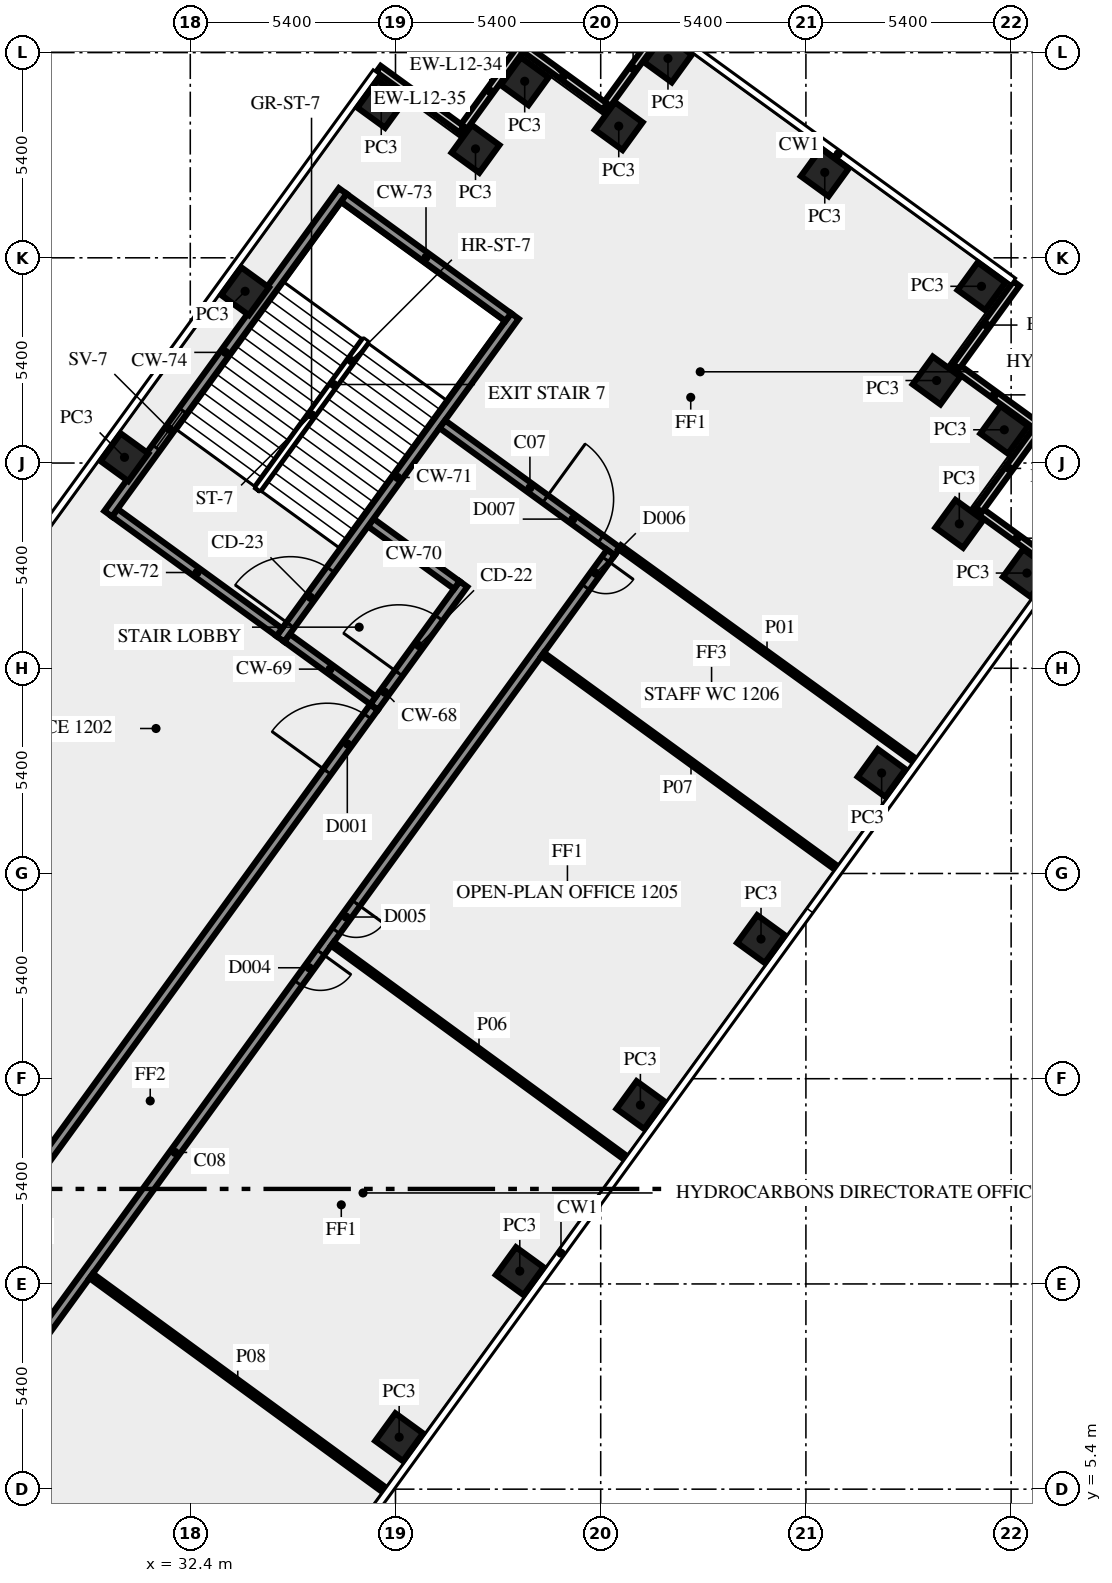
"""IFC4 building model, lengths in metres.
Left out: names, types, materials, properties, quantities, classifications, styles, units other than length and angle.
Written with IfcOpenShell. Run it as: python <this file> out.ifc"""

import sys

from ifc_helpers import new_model, si_unit, direction, frame, frame_2d, origin, origin_2d, place, context, subcontext, project, spatial, rectangle, extrude, element, fill, save


model = new_model("IFC4")
c1 = context("Model", 3, precision=1e-05, world=origin(), true_north=direction((0.0, 1.0)))
c2 = subcontext(c1, "Body", "Model", "MODEL_VIEW")
j1 = project(units=[si_unit("LENGTHUNIT", "METRE"), si_unit("PLANEANGLEUNIT", "RADIAN")], contexts=[c1])
p1 = place(None, origin())
s1 = spatial("IfcSite", under=j1, at=p1, CompositionType="ELEMENT")
p2 = place(p1, origin())
s2 = spatial("IfcBuilding", under=s1, at=p2, CompositionType="ELEMENT")
p3 = place(p2, frame((0.0, 0.0, 55.0)))
s3 = spatial("IfcBuildingStorey", under=s2, at=p3, CompositionType="ELEMENT", Elevation=55.0)
for number, where, z_axis, x_axis in (
    (1, (37.896, 6.769, 0.0), (0.0, 0.0, 1.0), (0.588, 0.809, 0.0)),
    (2, (41.07, 11.137, 0.0), (0.0, 0.0, 1.0), (0.588, 0.809, 0.0)),
    (3, (44.244, 15.506, 0.0), (0.0, 0.0, 1.0), (0.588, 0.809, 0.0)),
    (4, (47.418, 19.875, 0.0), (0.0, 0.0, 1.0), (0.588, 0.809, 0.0)),
    (5, (50.592, 24.243, 0.0), (0.0, 0.0, 1.0), (0.588, 0.809, 0.0)),
    (6, (54.415, 29.505, 0.0), (0.0, 0.0, 1.0), (0.588, 0.809, 0.0)),
    (7, (52.636, 30.8, 0.0), (0.0, 0.0, 1.0), (-0.809, 0.588, 0.0)),
    (8, (53.82, 33.275, 0.0), (0.0, 0.0, 1.0), (-0.809, 0.588, 0.0)),
    (9, (52.039, 34.571, 0.0), (0.0, 0.0, 1.0), (0.588, 0.809, 0.0)),
    (10, (53.22, 37.05, 0.0), (0.0, 0.0, 1.0), (-0.809, 0.588, 0.0)),
    (11, (49.096, 40.047, 0.0), (0.0, 0.0, 1.0), (-0.809, 0.588, 0.0)),
    (12, (44.97, 43.045, 0.0), (0.0, 0.0, 1.0), (-0.809, 0.588, 0.0)),
    (13, (43.675, 41.265, 0.0), (0.0, 0.0, 1.0), (-0.809, 0.588, 0.0)),
    (14, (41.2, 42.445, 0.0), (0.0, 0.0, 1.0), (-0.588, -0.809, 0.0)),
    (15, (39.906, 40.666, 0.0), (0.0, 0.0, 1.0), (-0.588, -0.809, 0.0)),
    (16, (37.425, 41.85, 0.0), (0.0, 0.0, 1.0), (-0.588, -0.809, 0.0)),
    (17, (33.843, 36.919, 0.0), (0.0, 0.0, 1.0), (-0.588, -0.809, 0.0)),
    (18, (30.669, 32.55, 0.0), (0.0, 0.0, 1.0), (-0.588, -0.809, 0.0)),
):
    element("IfcColumn", number, at=place(p3, frame(where, z_axis=z_axis, x_axis=x_axis)), inside=s3, PredefinedType="COLUMN", context=c2, shape_type="SweptSolid", body=[
        extrude(rectangle(XDim=0.9, YDim=0.9, at=origin_2d()), origin(), (0.0, 0.0, 1.0), 3.65),
    ])
p4 = place(p3, frame((55.247, 29.629, 0.0), z_axis=(0.0, 0.0, 1.0), x_axis=(-0.809033161865, 0.587762999008, 0.0)))
e19 = element("IfcWall", 19, at=p4, inside=s3, PredefinedType="SOLIDWALL", context=c2, shape_type="SweptSolid", body=[
    extrude(rectangle(XDim=2.7, YDim=0.2, at=frame_2d((1.35, 0.0))), origin(), (0.0, 0.0, 1.0), 3.65),
])
p5 = place(p3, frame((53.151, 31.167, 0.0), z_axis=(0.0, 0.0, 1.0), x_axis=(0.587779184282, 0.809021403008, 0.0)))
e20 = element("IfcWall", 20, at=p5, inside=s3, PredefinedType="SOLIDWALL", context=c2, shape_type="SweptSolid", body=[
    extrude(rectangle(XDim=2.7, YDim=0.2, at=frame_2d((1.35, 0.0))), origin(), (0.0, 0.0, 1.0), 3.65),
])
for number, where, z_axis, x_axis in (
    (21, (54.65, 33.4, 0.0), (0.0, 0.0, 1.0), (-0.809, 0.588, 0.0)),
    (22, (52.553, 34.938, 0.0), (0.0, 0.0, 1.0), (0.588, 0.809, 0.0)),
    (23, (44.846, 43.875, 0.0), (0.0, 0.0, 1.0), (-0.588, -0.809, 0.0)),
    (24, (43.308, 41.779, 0.0), (0.0, 0.0, 1.0), (-0.809, 0.588, 0.0)),
):
    element("IfcWall", number, at=place(p3, frame(where, z_axis=z_axis, x_axis=x_axis)), inside=s3, PredefinedType="SOLIDWALL", context=c2, shape_type="SweptSolid", body=[
        extrude(rectangle(XDim=2.7, YDim=0.2, at=frame_2d((1.35, 0.0))), origin(), (0.0, 0.0, 1.0), 3.65),
    ])
p6 = place(p3, frame((41.075, 43.278, 0.0), z_axis=(0.0, 0.0, 1.0), x_axis=(-0.587806000234, -0.809001919707, 0.0)))
e25 = element("IfcWall", 25, at=p6, inside=s3, PredefinedType="SOLIDWALL", context=c2, shape_type="SweptSolid", body=[
    extrude(rectangle(XDim=2.7, YDim=0.2, at=frame_2d((1.35, 0.0))), origin(), (0.0, 0.0, 1.0), 3.65),
])
p7 = place(p3, frame((39.537, 41.181, 0.0), z_axis=(0.0, 0.0, 1.0), x_axis=(-0.809033161865, 0.587762999008, 0.0)))
e26 = element("IfcWall", 26, at=p7, inside=s3, PredefinedType="SOLIDWALL", context=c2, shape_type="SweptSolid", body=[
    extrude(rectangle(XDim=2.7, YDim=0.2, at=frame_2d((1.35, 0.0))), origin(), (0.0, 0.0, 1.0), 3.65),
])
p8 = place(p3, frame((37.238, 25.98, 0.0), z_axis=(0.0, 0.0, 1.0), x_axis=(0.587772420479, 0.809026317077, 0.0)))
e27 = element("IfcWall", 27, at=p8, inside=s3, PredefinedType="SHEAR", context=c2, shape_type="SweptSolid", body=[
    extrude(rectangle(XDim=4.0, YDim=0.25, at=frame_2d((2.0, 0.0))), origin(), (0.0, 0.0, 1.0), 3.65),
])
p9 = place(p8, frame((1.1, 0.0, 0.0)))
e28 = element("IfcOpeningElement", 28, at=p9, cuts=e27, PredefinedType="OPENING", context=c2, shape_type="SweptSolid", body=[
    extrude(rectangle(XDim=1.8, YDim=2.1, at=frame_2d((0.9, 1.05))), frame((0.0, 0.135, 0.0), z_axis=(0.0, -1.0, 0.0), x_axis=(1.0, 0.0, 0.0)), (0.0, 0.0, 1.0), 0.27),
])
for number, where, z_axis, x_axis in (
    (29, (37.21, 26.154, 0.0), (0.0, 0.0, 1.0), (-0.809, 0.588, 0.0)),
    (30, (39.414, 29.188, 0.0), (0.0, 0.0, 1.0), (-0.809, 0.588, 0.0)),
):
    element("IfcWall", number, at=place(p3, frame(where, z_axis=z_axis, x_axis=x_axis)), inside=s3, PredefinedType="SHEAR", context=c2, shape_type="SweptSolid", body=[
        extrude(rectangle(XDim=2.8, YDim=0.25, at=frame_2d((1.4, 0.0))), origin(), (0.0, 0.0, 1.0), 3.65),
    ])
p10 = place(p3, frame((34.77, 27.772, 0.0), z_axis=(0.0, 0.0, 1.0), x_axis=(0.587795589702, 0.809009483706, 0.0)))
e31 = element("IfcWall", 31, at=p10, inside=s3, PredefinedType="SHEAR", context=c2, shape_type="SweptSolid", body=[
    extrude(rectangle(XDim=10.5, YDim=0.25, at=frame_2d((5.25, 0.0))), origin(), (0.0, 0.0, 1.0), 3.65),
])
p11 = place(p10, frame((0.45, 0.0, 0.0)))
e32 = element("IfcOpeningElement", 32, at=p11, cuts=e31, PredefinedType="OPENING", context=c2, shape_type="SweptSolid", body=[
    extrude(rectangle(XDim=1.8, YDim=2.1, at=frame_2d((0.9, 1.05))), frame((0.0, 0.135, 0.0), z_axis=(0.0, -1.0, 0.0), x_axis=(1.0, 0.0, 0.0)), (0.0, 0.0, 1.0), 0.27),
])
p12 = place(p3, frame((34.742, 27.947, 0.0), z_axis=(0.0, 0.0, 1.0), x_axis=(-0.8089984606, 0.587810760999, 0.0)))
e33 = element("IfcWall", 33, at=p12, inside=s3, PredefinedType="SHEAR", context=c2, shape_type="SweptSolid", body=[
    extrude(rectangle(XDim=5.35, YDim=0.25, at=frame_2d((2.675, 0.0))), origin(), (0.0, 0.0, 1.0), 3.65),
])
p13 = place(p3, frame((40.767, 36.24, 0.0), z_axis=(0.0, 0.0, 1.0), x_axis=(-0.809020161303, 0.587780893365, 0.0)))
e34 = element("IfcWall", 34, at=p13, inside=s3, PredefinedType="SHEAR", context=c2, shape_type="SweptSolid", body=[
    extrude(rectangle(XDim=5.35, YDim=0.25, at=frame_2d((2.675, 0.0))), origin(), (0.0, 0.0, 1.0), 3.65),
])
p14 = place(p3, frame((30.24, 31.064, 0.0), z_axis=(0.0, 0.0, 1.0), x_axis=(0.587795589702, 0.809009483706, 0.0)))
e35 = element("IfcWall", 35, at=p14, inside=s3, PredefinedType="SHEAR", context=c2, shape_type="SweptSolid", body=[
    extrude(rectangle(XDim=10.5, YDim=0.25, at=frame_2d((5.25, 0.0))), origin(), (0.0, 0.0, 1.0), 3.65),
])
p15 = place(p14, frame((2.15, 0.0, 1.0)))
e36 = element("IfcOpeningElement", 36, at=p15, cuts=e35, PredefinedType="OPENING", context=c2, shape_type="SweptSolid", body=[
    extrude(rectangle(XDim=1.2, YDim=1.2, at=frame_2d((0.6, 0.6))), frame((0.0, 0.135, 0.0), z_axis=(0.0, -1.0, 0.0), x_axis=(1.0, 0.0, 0.0)), (0.0, 0.0, 1.0), 0.27),
])
p16 = place(p3, frame((17.545, -1.125, 0.0), z_axis=(0.0, 0.0, 1.0), x_axis=(0.587786323093, 0.809016216391, 0.0)))
e37 = element("IfcWall", 37, at=p16, inside=s3, PredefinedType="SOLIDWALL", context=c2, shape_type="SweptSolid", body=[
    extrude(rectangle(XDim=33.493, YDim=0.25, at=frame_2d((16.747, 0.0))), origin(), (0.0, 0.0, 1.0), 3.65),
])
p17 = place(p16, frame((31.403, 0.0, 0.0)))
e38 = element("IfcOpeningElement", 38, at=p17, cuts=e37, PredefinedType="OPENING", context=c2, shape_type="SweptSolid", body=[
    extrude(rectangle(XDim=1.8, YDim=2.1, at=frame_2d((0.9, 1.05))), frame((0.0, 0.135, 0.0), z_axis=(0.0, -1.0, 0.0), x_axis=(1.0, 0.0, 0.0)), (0.0, 0.0, 1.0), 0.27),
])
p18 = place(p16, frame((3.392, 0.0, 0.0)))
e39 = element("IfcOpeningElement", 39, at=p18, cuts=e37, PredefinedType="OPENING", context=c2, shape_type="SweptSolid", body=[
    extrude(rectangle(XDim=1.8, YDim=2.1, at=frame_2d((0.9, 1.05))), frame((0.0, 0.135, 0.0), z_axis=(0.0, -1.0, 0.0), x_axis=(1.0, 0.0, 0.0)), (0.0, 0.0, 1.0), 0.27),
])
p19 = place(p3, frame((39.034, 33.42, 0.0), z_axis=(0.0, 0.0, 1.0), x_axis=(0.809023325802, -0.587776537732, 0.0)))
e40 = element("IfcWall", 40, at=p19, inside=s3, PredefinedType="SOLIDWALL", context=c2, shape_type="SweptSolid", body=[
    extrude(rectangle(XDim=5.695, YDim=0.25, at=frame_2d((2.848, 0.0))), origin(), (0.0, 0.0, 1.0), 3.65),
])
p20 = place(p19, frame((3.345, 0.0, 0.0)))
e41 = element("IfcOpeningElement", 41, at=p20, cuts=e40, PredefinedType="OPENING", context=c2, shape_type="SweptSolid", body=[
    extrude(rectangle(XDim=1.8, YDim=2.1, at=frame_2d((0.9, 1.05))), frame((0.0, 0.135, 0.0), z_axis=(0.0, -1.0, 0.0), x_axis=(1.0, 0.0, 0.0)), (0.0, 0.0, 1.0), 0.27),
])
p21 = place(p3, frame((43.467, 30.045, 0.0), z_axis=(0.0, 0.0, 1.0), x_axis=(-0.587784726077, -0.809017376692, 0.0)))
e42 = element("IfcWall", 42, at=p21, inside=s3, PredefinedType="SOLIDWALL", context=c2, shape_type="SweptSolid", body=[
    extrude(rectangle(XDim=39.02, YDim=0.25, at=frame_2d((19.51, 0.0))), origin(), (0.0, 0.0, 1.0), 3.65),
])
p22 = place(p21, frame((11.404, 0.0, 0.0)))
e43 = element("IfcOpeningElement", 43, at=p22, cuts=e42, PredefinedType="OPENING", context=c2, shape_type="SweptSolid", body=[
    extrude(rectangle(XDim=0.9, YDim=2.1, at=frame_2d((0.45, 1.05))), frame((0.0, 0.135, 0.0), z_axis=(0.0, -1.0, 0.0), x_axis=(1.0, 0.0, 0.0)), (0.0, 0.0, 1.0), 0.27),
])
p23 = place(p21, frame((13.004, 0.0, 0.0)))
e44 = element("IfcOpeningElement", 44, at=p23, cuts=e42, PredefinedType="OPENING", context=c2, shape_type="SweptSolid", body=[
    extrude(rectangle(XDim=1.0, YDim=2.1, at=frame_2d((0.5, 1.05))), frame((0.0, 0.135, 0.0), z_axis=(0.0, -1.0, 0.0), x_axis=(1.0, 0.0, 0.0)), (0.0, 0.0, 1.0), 0.27),
])
p24 = place(p21, frame((37.287, 0.0, 0.0)))
e45 = element("IfcOpeningElement", 45, at=p24, cuts=e42, PredefinedType="OPENING", context=c2, shape_type="SweptSolid", body=[
    extrude(rectangle(XDim=1.2, YDim=2.1, at=frame_2d((0.6, 1.05))), frame((0.0, 0.135, 0.0), z_axis=(0.0, -1.0, 0.0), x_axis=(1.0, 0.0, 0.0)), (0.0, 0.0, 1.0), 0.27),
])
p25 = place(p21, frame((0.224, 0.0, 0.0)))
e46 = element("IfcOpeningElement", 46, at=p25, cuts=e42, PredefinedType="OPENING", context=c2, shape_type="SweptSolid", body=[
    extrude(rectangle(XDim=0.9, YDim=2.1, at=frame_2d((0.45, 1.05))), frame((0.0, 0.135, 0.0), z_axis=(0.0, -1.0, 0.0), x_axis=(1.0, 0.0, 0.0)), (0.0, 0.0, 1.0), 0.27),
])
p26 = place(p3, frame((43.698, 30.185, 0.0), z_axis=(0.0, 0.0, 1.0), x_axis=(0.810419489461, -0.58585002441, 0.0)))
e47 = element("IfcWall", 47, at=p26, inside=s3, PredefinedType="PARTITIONING", context=c2, shape_type="SweptSolid", body=[
    extrude(rectangle(XDim=9.57, YDim=0.12, at=frame_2d((4.785, 0.0))), origin(), (0.0, 0.0, 1.0), 2.75),
])
p27 = place(p3, frame((36.141, 19.749, 0.0), z_axis=(0.0, 0.0, 1.0), x_axis=(0.807691251741, -0.589605666408, 0.0)))
e48 = element("IfcWall", 48, at=p27, inside=s3, PredefinedType="PARTITIONING", context=c2, shape_type="SweptSolid", body=[
    extrude(rectangle(XDim=9.55, YDim=0.12, at=frame_2d((4.775, 0.0))), origin(), (0.0, 0.0, 1.0), 2.75),
])
p28 = place(p3, frame((49.48, 21.69, 0.0), z_axis=(0.0, 0.0, 1.0), x_axis=(-0.808999631097, 0.587809150052, 0.0)))
e49 = element("IfcWall", 49, at=p28, inside=s3, PredefinedType="PARTITIONING", context=c2, shape_type="SweptSolid", body=[
    extrude(rectangle(XDim=9.651, YDim=0.12, at=frame_2d((4.826, 0.0))), origin(), (0.0, 0.0, 1.0), 2.75),
])
p29 = place(p3, frame((29.793, 11.012, 0.0), z_axis=(0.0, 0.0, 1.0), x_axis=(0.807645841498, -0.589667868135, 0.0)))
e50 = element("IfcWall", 50, at=p29, inside=s3, PredefinedType="PARTITIONING", context=c2, shape_type="SweptSolid", body=[
    extrude(rectangle(XDim=9.551, YDim=0.15, at=frame_2d((4.775, 0.0))), origin(), (0.0, 0.0, 1.0), 2.75),
])
p30 = place(p9, origin())
e51 = element("IfcDoor", 51, at=p30, inside=s3, OperationType="DOUBLE_DOOR_SINGLE_SWING", PredefinedType="DOOR", context=c2, shape_type="SweptSolid", body=[
    extrude(rectangle(XDim=1.8, YDim=2.1, at=frame_2d((0.9, 1.05))), frame((0.0, 0.025, 0.0), z_axis=(0.0, -1.0, 0.0), x_axis=(1.0, 0.0, 0.0)), (0.0, 0.0, 1.0), 0.05),
])
fill(e28, e51)
p31 = place(p11, origin())
e52 = element("IfcDoor", 52, at=p31, inside=s3, OperationType="DOUBLE_DOOR_SINGLE_SWING", PredefinedType="DOOR", context=c2, shape_type="SweptSolid", body=[
    extrude(rectangle(XDim=1.8, YDim=2.1, at=frame_2d((0.9, 1.05))), frame((0.0, 0.025, 0.0), z_axis=(0.0, -1.0, 0.0), x_axis=(1.0, 0.0, 0.0)), (0.0, 0.0, 1.0), 0.05),
])
fill(e32, e52)
p32 = place(p15, origin())
e53 = element("IfcWindow", 53, at=p32, inside=s3, PartitioningType="SINGLE_PANEL", PredefinedType="WINDOW", context=c2, shape_type="SweptSolid", body=[
    extrude(rectangle(XDim=1.2, YDim=1.2, at=frame_2d((0.6, 0.6))), frame((0.0, 0.03, 0.0), z_axis=(0.0, -1.0, 0.0), x_axis=(1.0, 0.0, 0.0)), (0.0, 0.0, 1.0), 0.06),
])
fill(e36, e53)
p33 = place(p17, origin())
e54 = element("IfcDoor", 54, at=p33, inside=s3, OperationType="DOUBLE_DOOR_SINGLE_SWING", PredefinedType="DOOR", context=c2, shape_type="SweptSolid", body=[
    extrude(rectangle(XDim=1.8, YDim=2.1, at=frame_2d((0.9, 1.05))), frame((0.0, 0.025, 0.0), z_axis=(0.0, -1.0, 0.0), x_axis=(1.0, 0.0, 0.0)), (0.0, 0.0, 1.0), 0.05),
])
fill(e38, e54)
p34 = place(p20, origin())
e55 = element("IfcDoor", 55, at=p34, inside=s3, OperationType="DOUBLE_DOOR_SINGLE_SWING", PredefinedType="DOOR", context=c2, shape_type="SweptSolid", body=[
    extrude(rectangle(XDim=1.8, YDim=2.1, at=frame_2d((0.9, 1.05))), frame((0.0, 0.025, 0.0), z_axis=(0.0, -1.0, 0.0), x_axis=(1.0, 0.0, 0.0)), (0.0, 0.0, 1.0), 0.05),
])
fill(e41, e55)
p35 = place(p22, origin())
e56 = element("IfcDoor", 56, at=p35, inside=s3, OperationType="SINGLE_SWING_RIGHT", PredefinedType="DOOR", context=c2, shape_type="SweptSolid", body=[
    extrude(rectangle(XDim=0.9, YDim=2.1, at=frame_2d((0.45, 1.05))), frame((0.0, 0.025, 0.0), z_axis=(0.0, -1.0, 0.0), x_axis=(1.0, 0.0, 0.0)), (0.0, 0.0, 1.0), 0.05),
])
fill(e43, e56)
p36 = place(p23, origin())
e57 = element("IfcDoor", 57, at=p36, inside=s3, OperationType="SINGLE_SWING_LEFT", PredefinedType="DOOR", context=c2, shape_type="SweptSolid", body=[
    extrude(rectangle(XDim=1.0, YDim=2.1, at=frame_2d((0.5, 1.05))), frame((0.0, 0.025, 0.0), z_axis=(0.0, -1.0, 0.0), x_axis=(1.0, 0.0, 0.0)), (0.0, 0.0, 1.0), 0.05),
])
fill(e44, e57)
p37 = place(p25, origin())
e58 = element("IfcDoor", 58, at=p37, inside=s3, OperationType="SINGLE_SWING_LEFT", PredefinedType="DOOR", context=c2, shape_type="SweptSolid", body=[
    extrude(rectangle(XDim=0.9, YDim=2.1, at=frame_2d((0.45, 1.05))), frame((0.0, 0.025, 0.0), z_axis=(0.0, -1.0, 0.0), x_axis=(1.0, 0.0, 0.0)), (0.0, 0.0, 1.0), 0.05),
])
fill(e46, e58)
save(model, sys.argv[1])
